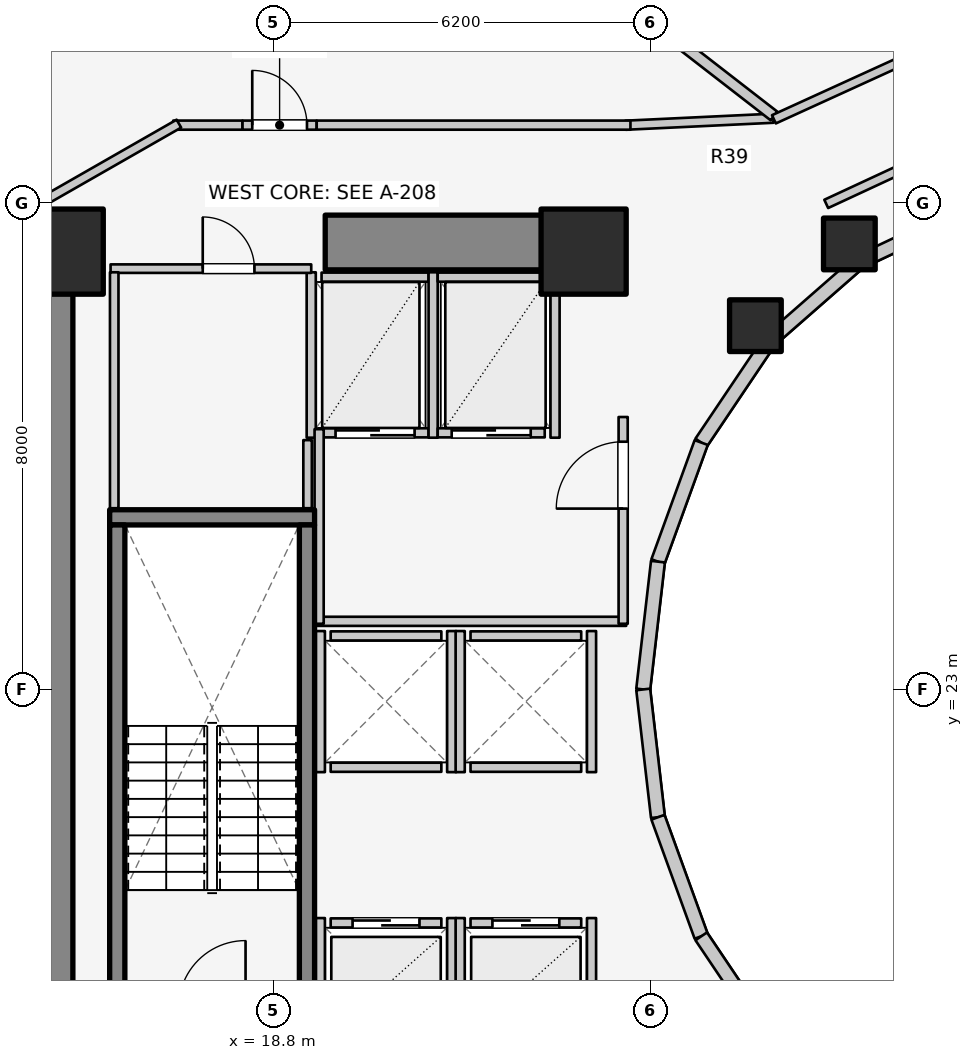
"""IFC4 building model, lengths in metres.
Left out: names, types, materials, properties, quantities, classifications, styles, units other than length and angle.
Written with IfcOpenShell. Run it as: python <this file> out.ifc"""

import sys

from ifc_helpers import new_model, si_unit, direction, frame, frame_2d, origin, origin_2d, place, context, subcontext, project, spatial, rectangle, extrude, element, fill, save


model = new_model("IFC4")
c1 = context("Model", 3, precision=1e-05, world=origin(), true_north=direction((0.0, 1.0)))
c2 = subcontext(c1, "Body", "Model", "MODEL_VIEW")
j1 = project(units=[si_unit("LENGTHUNIT", "METRE"), si_unit("PLANEANGLEUNIT", "RADIAN")], contexts=[c1])
p1 = place(None, origin())
s1 = spatial("IfcSite", under=j1, at=p1, CompositionType="ELEMENT")
p2 = place(p1, origin())
s2 = spatial("IfcBuilding", under=s1, at=p2, CompositionType="ELEMENT")
p3 = place(p2, frame((0.0, 0.0, 82.5)))
s3 = spatial("IfcBuildingStorey", under=s2, at=p3, CompositionType="ELEMENT", Elevation=82.5)
p4 = place(p3, frame((15.05, 17.05, 0.0), z_axis=(0.0, 0.0, 1.0), x_axis=(0.0, 1.0, 0.0)))
e1 = element("IfcWall", 1, at=p4, inside=s3, PredefinedType="SHEAR", context=c2, shape_type="SweptSolid", body=[
    extrude(rectangle(XDim=12.8, YDim=0.9, at=frame_2d((6.4, 0.0))), origin(), (0.0, 0.0, 1.0), 3.1),
])
p5 = place(p3, frame((19.65, 30.35, 0.0), z_axis=(0.0, 0.0, 1.0), x_axis=(1.0, 0.0, 0.0)))
e2 = element("IfcWall", 2, at=p5, inside=s3, PredefinedType="SHEAR", context=c2, shape_type="SweptSolid", body=[
    extrude(rectangle(XDim=4.5, YDim=0.9, at=frame_2d((2.25, 0.0))), origin(), (0.0, 0.0, 1.0), 3.1),
])
p6 = place(p3, frame((16.105, 25.83, 0.0), z_axis=(0.0, 0.0, 1.0), x_axis=(1.0, 0.0, 0.0)))
e3 = element("IfcWall", 3, at=p6, inside=s3, PredefinedType="SOLIDWALL", context=c2, shape_type="SweptSolid", body=[
    extrude(rectangle(XDim=3.37, YDim=0.25, at=frame_2d((1.685, 0.0))), origin(), (0.0, 0.0, 1.0), 3.1),
])
for number, where, z_axis, x_axis in (
    (4, (16.23, 17.895, 0.0), (0.0, 0.0, 1.0), (0.0, 1.0, 0.0)),
    (5, (19.35, 17.895, 0.0), (0.0, 0.0, 1.0), (0.0, 1.0, 0.0)),
):
    element("IfcWall", number, at=place(p3, frame(where, z_axis=z_axis, x_axis=x_axis)), inside=s3, PredefinedType="SOLIDWALL", context=c2, shape_type="SweptSolid", body=[
        extrude(rectangle(XDim=7.81, YDim=0.25, at=frame_2d((3.905, 0.0))), origin(), (0.0, 0.0, 1.0), 3.1),
    ])
for number, where, z_axis, x_axis in (
    (6, (23.9, 30.2, 0.0), (0.0, 0.0, 1.0), (1.0, 0.0, 0.0)),
    (7, (15.3, 30.2, 0.0), (0.0, 0.0, 1.0), (1.0, 0.0, 0.0)),
):
    element("IfcColumn", number, at=place(p3, frame(where, z_axis=z_axis, x_axis=x_axis)), inside=s3, PredefinedType="COLUMN", context=c2, shape_type="SweptSolid", body=[
        extrude(rectangle(XDim=1.4, YDim=1.4, at=origin_2d()), origin(), (0.0, 0.0, 1.0), 3.1),
    ])
for number, where, z_axis, x_axis in (
    (8, (28.27, 30.327, 0.0), (0.0, 0.0, 1.0), (1.0, 0.0, 0.0)),
    (9, (26.725, 28.982, 0.0), (0.0, 0.0, 1.0), (1.0, 0.0, 0.0)),
):
    element("IfcColumn", number, at=place(p3, frame(where, z_axis=z_axis, x_axis=x_axis)), inside=s3, PredefinedType="COLUMN", context=c2, shape_type="SweptSolid", body=[
        extrude(rectangle(XDim=0.85, YDim=0.85, at=origin_2d()), origin(), (0.0, 0.0, 1.0), 3.1),
    ])
p7 = place(p3, frame((30.157, 30.843, 0.0), z_axis=(0.0, 0.0, 1.0), x_axis=(-0.904179699603, -0.427152280606, 0.0)))
e10 = element("IfcWall", 10, at=p7, inside=s3, PredefinedType="STANDARD", context=c2, shape_type="SweptSolid", body=[
    extrude(rectangle(XDim=1.899, YDim=0.23, at=frame_2d((0.95, 0.0))), origin(), (0.0, 0.0, 1.0), 1.22),
])
p8 = place(p3, frame((28.44, 30.032, 0.0), z_axis=(0.0, 0.0, 1.0), x_axis=(-0.752576694707, -0.658504607869, 0.0)))
e11 = element("IfcWall", 11, at=p8, inside=s3, PredefinedType="STANDARD", context=c2, shape_type="SweptSolid", body=[
    extrude(rectangle(XDim=1.959, YDim=0.23, at=frame_2d((0.98, 0.0))), origin(), (0.0, 0.0, 1.0), 1.22),
])
p9 = place(p3, frame((26.965, 28.742, 0.0), z_axis=(0.0, 0.0, 1.0), x_axis=(-0.558197800898, -0.829707909492, 0.0)))
e12 = element("IfcWall", 12, at=p9, inside=s3, PredefinedType="STANDARD", context=c2, shape_type="SweptSolid", body=[
    extrude(rectangle(XDim=2.027, YDim=0.23, at=frame_2d((1.013, 0.0))), origin(), (0.0, 0.0, 1.0), 1.22),
])
p10 = place(p3, frame((25.834, 27.06, 0.0), z_axis=(0.0, 0.0, 1.0), x_axis=(-0.341423187295, -0.93990968033, 0.0)))
e13 = element("IfcWall", 13, at=p10, inside=s3, PredefinedType="STANDARD", context=c2, shape_type="SweptSolid", body=[
    extrude(rectangle(XDim=2.084, YDim=0.23, at=frame_2d((1.042, 0.0))), origin(), (0.0, 0.0, 1.0), 2.56),
])
for number, where, z_axis, x_axis in (
    (14, (25.123, 25.102, 0.0), (0.0, 0.0, 1.0), (-0.115, -0.993, 0.0)),
    (15, (24.88, 23.0, 0.0), (0.0, 0.0, 1.0), (0.115, -0.993, 0.0)),
):
    element("IfcWall", number, at=place(p3, frame(where, z_axis=z_axis, x_axis=x_axis)), inside=s3, PredefinedType="STANDARD", context=c2, shape_type="SweptSolid", body=[
        extrude(rectangle(XDim=2.115, YDim=0.23, at=frame_2d((1.058, 0.0))), origin(), (0.0, 0.0, 1.0), 2.56),
    ])
p11 = place(p3, frame((25.123, 20.898, 0.0), z_axis=(0.0, 0.0, 1.0), x_axis=(0.341423187295, -0.93990968033, 0.0)))
e16 = element("IfcWall", 16, at=p11, inside=s3, PredefinedType="STANDARD", context=c2, shape_type="SweptSolid", body=[
    extrude(rectangle(XDim=2.084, YDim=0.23, at=frame_2d((1.042, 0.0))), origin(), (0.0, 0.0, 1.0), 2.56),
])
p12 = place(p3, frame((25.834, 18.94, 0.0), z_axis=(0.0, 0.0, 1.0), x_axis=(0.558197800898, -0.829707909492, 0.0)))
e17 = element("IfcWall", 17, at=p12, inside=s3, PredefinedType="STANDARD", context=c2, shape_type="SweptSolid", body=[
    extrude(rectangle(XDim=2.027, YDim=0.23, at=frame_2d((1.013, 0.0))), origin(), (0.0, 0.0, 1.0), 1.22),
])
p13 = place(p3, frame((19.74, 19.16, 0.0), z_axis=(0.0, 0.0, 1.0), x_axis=(1.0, 0.0, 0.0)))
e18 = element("IfcWall", 18, at=p13, inside=s3, PredefinedType="SOLIDWALL", context=c2, shape_type="SweptSolid", body=[
    extrude(rectangle(XDim=1.82, YDim=0.15, at=frame_2d((0.91, 0.0))), origin(), (0.0, 0.0, 1.0), 2.575),
])
p14 = place(p13, frame((0.36, 0.0, 0.0)))
e19 = element("IfcOpeningElement", 19, at=p14, cuts=e18, PredefinedType="OPENING", context=c2, shape_type="SweptSolid", body=[
    extrude(rectangle(XDim=1.1, YDim=2.1, at=frame_2d((0.55, 1.05))), frame((0.0, 0.085, 0.0), z_axis=(0.0, -1.0, 0.0), x_axis=(1.0, 0.0, 0.0)), (0.0, 0.0, 1.0), 0.17),
])
p15 = place(p3, frame((19.57, 17.02, 0.0), z_axis=(0.0, 0.0, 1.0), x_axis=(0.0, 1.0, 0.0)))
e20 = element("IfcWall", 20, at=p15, inside=s3, PredefinedType="SOLIDWALL", context=c2, shape_type="SweptSolid", body=[
    extrude(rectangle(XDim=2.22, YDim=0.15, at=frame_2d((1.11, 0.0))), origin(), (0.0, 0.0, 1.0), 2.12),
])
p16 = place(p3, frame((21.73, 17.02, 0.0), z_axis=(0.0, 0.0, 1.0), x_axis=(0.0, 1.0, 0.0)))
e21 = element("IfcWall", 21, at=p16, inside=s3, PredefinedType="SOLIDWALL", context=c2, shape_type="SweptSolid", body=[
    extrude(rectangle(XDim=2.22, YDim=0.15, at=frame_2d((1.11, 0.0))), origin(), (0.0, 0.0, 1.0), 2.575),
])
p17 = place(p3, frame((22.04, 19.16, 0.0), z_axis=(0.0, 0.0, 1.0), x_axis=(1.0, 0.0, 0.0)))
e22 = element("IfcWall", 22, at=p17, inside=s3, PredefinedType="SOLIDWALL", context=c2, shape_type="SweptSolid", body=[
    extrude(rectangle(XDim=1.82, YDim=0.15, at=frame_2d((0.91, 0.0))), origin(), (0.0, 0.0, 1.0), 2.12),
])
p18 = place(p17, frame((0.36, 0.0, 0.0)))
e23 = element("IfcOpeningElement", 23, at=p18, cuts=e22, PredefinedType="OPENING", context=c2, shape_type="SweptSolid", body=[
    extrude(rectangle(XDim=1.1, YDim=2.1, at=frame_2d((0.55, 1.05))), frame((0.0, 0.085, 0.0), z_axis=(0.0, -1.0, 0.0), x_axis=(1.0, 0.0, 0.0)), (0.0, 0.0, 1.0), 0.17),
])
p19 = place(p3, frame((21.87, 17.02, 0.0), z_axis=(0.0, 0.0, 1.0), x_axis=(0.0, 1.0, 0.0)))
e24 = element("IfcWall", 24, at=p19, inside=s3, PredefinedType="SOLIDWALL", context=c2, shape_type="SweptSolid", body=[
    extrude(rectangle(XDim=2.22, YDim=0.15, at=frame_2d((1.11, 0.0))), origin(), (0.0, 0.0, 1.0), 2.575),
])
p20 = place(p3, frame((24.03, 17.02, 0.0), z_axis=(0.0, 0.0, 1.0), x_axis=(0.0, 1.0, 0.0)))
e25 = element("IfcWall", 25, at=p20, inside=s3, PredefinedType="SOLIDWALL", context=c2, shape_type="SweptSolid", body=[
    extrude(rectangle(XDim=2.22, YDim=0.15, at=frame_2d((1.11, 0.0))), origin(), (0.0, 0.0, 1.0), 1.873),
])
for number, where, z_axis, x_axis in (
    (26, (19.74, 21.72, 0.0), (0.0, 0.0, 1.0), (1.0, 0.0, 0.0)),
    (27, (19.74, 23.88, 0.0), (0.0, 0.0, 1.0), (1.0, 0.0, 0.0)),
):
    element("IfcWall", number, at=place(p3, frame(where, z_axis=z_axis, x_axis=x_axis)), inside=s3, PredefinedType="SOLIDWALL", context=c2, shape_type="SweptSolid", body=[
        extrude(rectangle(XDim=1.82, YDim=0.15, at=frame_2d((0.91, 0.0))), origin(), (0.0, 0.0, 1.0), 2.575),
    ])
for number, where, z_axis, x_axis in (
    (28, (19.57, 21.64, 0.0), (0.0, 0.0, 1.0), (0.0, 1.0, 0.0)),
    (29, (21.73, 21.64, 0.0), (0.0, 0.0, 1.0), (0.0, 1.0, 0.0)),
):
    element("IfcWall", number, at=place(p3, frame(where, z_axis=z_axis, x_axis=x_axis)), inside=s3, PredefinedType="SOLIDWALL", context=c2, shape_type="SweptSolid", body=[
        extrude(rectangle(XDim=2.32, YDim=0.15, at=frame_2d((1.16, 0.0))), origin(), (0.0, 0.0, 1.0), 2.575),
    ])
for number, where, z_axis, x_axis in (
    (30, (22.04, 21.72, 0.0), (0.0, 0.0, 1.0), (1.0, 0.0, 0.0)),
    (31, (22.04, 23.88, 0.0), (0.0, 0.0, 1.0), (1.0, 0.0, 0.0)),
):
    element("IfcWall", number, at=place(p3, frame(where, z_axis=z_axis, x_axis=x_axis)), inside=s3, PredefinedType="SOLIDWALL", context=c2, shape_type="SweptSolid", body=[
        extrude(rectangle(XDim=1.82, YDim=0.15, at=frame_2d((0.91, 0.0))), origin(), (0.0, 0.0, 1.0), 2.12),
    ])
p21 = place(p3, frame((21.87, 21.64, 0.0), z_axis=(0.0, 0.0, 1.0), x_axis=(0.0, 1.0, 0.0)))
e32 = element("IfcWall", 32, at=p21, inside=s3, PredefinedType="SOLIDWALL", context=c2, shape_type="SweptSolid", body=[
    extrude(rectangle(XDim=2.32, YDim=0.15, at=frame_2d((1.16, 0.0))), origin(), (0.0, 0.0, 1.0), 2.575),
])
p22 = place(p3, frame((24.03, 21.64, 0.0), z_axis=(0.0, 0.0, 1.0), x_axis=(0.0, 1.0, 0.0)))
e33 = element("IfcWall", 33, at=p22, inside=s3, PredefinedType="SOLIDWALL", context=c2, shape_type="SweptSolid", body=[
    extrude(rectangle(XDim=2.32, YDim=0.15, at=frame_2d((1.16, 0.0))), origin(), (0.0, 0.0, 1.0), 2.12),
])
p23 = place(p3, frame((19.59, 27.22, 0.0), z_axis=(0.0, 0.0, 1.0), x_axis=(1.0, 0.0, 0.0)))
e34 = element("IfcWall", 34, at=p23, inside=s3, PredefinedType="SOLIDWALL", context=c2, shape_type="SweptSolid", body=[
    extrude(rectangle(XDim=1.76, YDim=0.15, at=frame_2d((0.88, 0.0))), origin(), (0.0, 0.0, 1.0), 2.575),
])
p24 = place(p23, frame((0.23, 0.0, 0.0)))
e35 = element("IfcOpeningElement", 35, at=p24, cuts=e34, PredefinedType="OPENING", context=c2, shape_type="SweptSolid", body=[
    extrude(rectangle(XDim=1.3, YDim=2.1, at=frame_2d((0.65, 1.05))), frame((0.0, 0.085, 0.0), z_axis=(0.0, -1.0, 0.0), x_axis=(1.0, 0.0, 0.0)), (0.0, 0.0, 1.0), 0.17),
])
p25 = place(p3, frame((19.59, 29.78, 0.0), z_axis=(0.0, 0.0, 1.0), x_axis=(1.0, 0.0, 0.0)))
e36 = element("IfcWall", 36, at=p25, inside=s3, PredefinedType="SOLIDWALL", context=c2, shape_type="SweptSolid", body=[
    extrude(rectangle(XDim=1.76, YDim=0.15, at=frame_2d((0.88, 0.0))), origin(), (0.0, 0.0, 1.0), 2.575),
])
for number, where, z_axis, x_axis in (
    (37, (19.42, 27.14, 0.0), (0.0, 0.0, 1.0), (0.0, 1.0, 0.0)),
    (38, (21.425, 27.14, 0.0), (0.0, 0.0, 1.0), (0.0, 1.0, 0.0)),
):
    element("IfcWall", number, at=place(p3, frame(where, z_axis=z_axis, x_axis=x_axis)), inside=s3, PredefinedType="SOLIDWALL", context=c2, shape_type="SweptSolid", body=[
        extrude(rectangle(XDim=2.72, YDim=0.15, at=frame_2d((1.36, 0.0))), origin(), (0.0, 0.0, 1.0), 2.575),
    ])
p26 = place(p3, frame((21.5, 27.22, 0.0), z_axis=(0.0, 0.0, 1.0), x_axis=(1.0, 0.0, 0.0)))
e39 = element("IfcWall", 39, at=p26, inside=s3, PredefinedType="SOLIDWALL", context=c2, shape_type="SweptSolid", body=[
    extrude(rectangle(XDim=1.76, YDim=0.15, at=frame_2d((0.88, 0.0))), origin(), (0.0, 0.0, 1.0), 2.575),
])
p27 = place(p26, frame((0.23, 0.0, 0.0)))
e40 = element("IfcOpeningElement", 40, at=p27, cuts=e39, PredefinedType="OPENING", context=c2, shape_type="SweptSolid", body=[
    extrude(rectangle(XDim=1.3, YDim=2.1, at=frame_2d((0.65, 1.05))), frame((0.0, 0.085, 0.0), z_axis=(0.0, -1.0, 0.0), x_axis=(1.0, 0.0, 0.0)), (0.0, 0.0, 1.0), 0.17),
])
p28 = place(p3, frame((21.5, 29.78, 0.0), z_axis=(0.0, 0.0, 1.0), x_axis=(1.0, 0.0, 0.0)))
e41 = element("IfcWall", 41, at=p28, inside=s3, PredefinedType="SOLIDWALL", context=c2, shape_type="SweptSolid", body=[
    extrude(rectangle(XDim=1.76, YDim=0.15, at=frame_2d((0.88, 0.0))), origin(), (0.0, 0.0, 1.0), 2.575),
])
p29 = place(p3, frame((23.43, 27.14, 0.0), z_axis=(0.0, 0.0, 1.0), x_axis=(0.0, 1.0, 0.0)))
e42 = element("IfcWall", 42, at=p29, inside=s3, PredefinedType="SOLIDWALL", context=c2, shape_type="SweptSolid", body=[
    extrude(rectangle(XDim=2.72, YDim=0.15, at=frame_2d((1.36, 0.0))), origin(), (0.0, 0.0, 1.0), 2.575),
])
p30 = place(p3, frame((19.52, 24.12, 0.0), z_axis=(0.0, 0.0, 1.0), x_axis=(1.0, 0.0, 0.0)))
e43 = element("IfcWall", 43, at=p30, inside=s3, PredefinedType="PARTITIONING", context=c2, shape_type="SweptSolid", body=[
    extrude(rectangle(XDim=5.08, YDim=0.15, at=frame_2d((2.54, 0.0))), origin(), (0.0, 0.0, 1.0), 2.12),
])
p31 = place(p3, frame((19.55, 24.08, 0.0), z_axis=(0.0, 0.0, 1.0), x_axis=(0.0, 1.0, 0.0)))
e44 = element("IfcWall", 44, at=p31, inside=s3, PredefinedType="PARTITIONING", context=c2, shape_type="SweptSolid", body=[
    extrude(rectangle(XDim=3.2, YDim=0.15, at=frame_2d((1.6, 0.0))), origin(), (0.0, 0.0, 1.0), 2.575),
])
p32 = place(p3, frame((24.55, 24.08, 0.0), z_axis=(0.0, 0.0, 1.0), x_axis=(0.0, 1.0, 0.0)))
e45 = element("IfcWall", 45, at=p32, inside=s3, PredefinedType="PARTITIONING", context=c2, shape_type="SweptSolid", body=[
    extrude(rectangle(XDim=3.4, YDim=0.15, at=frame_2d((1.7, 0.0))), origin(), (0.0, 0.0, 1.0), 2.575),
])
p33 = place(p32, frame((1.894, 0.0, 0.0)))
e46 = element("IfcOpeningElement", 46, at=p33, cuts=e45, PredefinedType="OPENING", context=c2, shape_type="SweptSolid", body=[
    extrude(rectangle(XDim=1.1, YDim=2.1, at=frame_2d((0.55, 1.05))), frame((0.0, 0.085, 0.0), z_axis=(0.0, -1.0, 0.0), x_axis=(1.0, 0.0, 0.0)), (0.0, 0.0, 1.0), 0.17),
])
p34 = place(p3, frame((16.12, 29.92, 0.0), z_axis=(0.0, 0.0, 1.0), x_axis=(1.0, 0.0, 0.0)))
e47 = element("IfcWall", 47, at=p34, inside=s3, PredefinedType="PLUMBINGWALL", context=c2, shape_type="SweptSolid", body=[
    extrude(rectangle(XDim=3.3, YDim=0.14, at=frame_2d((1.65, 0.0))), origin(), (0.0, 0.0, 1.0), 2.575),
])
p35 = place(p34, frame((1.516, 0.0, 0.0)))
e48 = element("IfcOpeningElement", 48, at=p35, cuts=e47, PredefinedType="OPENING", context=c2, shape_type="SweptSolid", body=[
    extrude(rectangle(XDim=0.85, YDim=2.05, at=frame_2d((0.425, 1.025))), frame((0.0, 0.08, 0.0), z_axis=(0.0, -1.0, 0.0), x_axis=(1.0, 0.0, 0.0)), (0.0, 0.0, 1.0), 0.16),
])
p36 = place(p3, frame((16.18, 25.98, 0.0), z_axis=(0.0, 0.0, 1.0), x_axis=(0.0, 1.0, 0.0)))
e49 = element("IfcWall", 49, at=p36, inside=s3, PredefinedType="PLUMBINGWALL", context=c2, shape_type="SweptSolid", body=[
    extrude(rectangle(XDim=3.88, YDim=0.14, at=frame_2d((1.94, 0.0))), origin(), (0.0, 0.0, 1.0), 2.575),
])
p37 = place(p3, frame((19.36, 25.98, 0.0), z_axis=(0.0, 0.0, 1.0), x_axis=(0.0, 1.0, 0.0)))
e50 = element("IfcWall", 50, at=p37, inside=s3, PredefinedType="PLUMBINGWALL", context=c2, shape_type="SweptSolid", body=[
    extrude(rectangle(XDim=1.12, YDim=0.14, at=frame_2d((0.56, 0.0))), origin(), (0.0, 0.0, 1.0), 2.575),
])
p38 = place(p3, frame((29.873, 31.906, 0.0), z_axis=(0.0, 0.0, 1.0), x_axis=(-0.906943449489, -0.421252393975, 0.0)))
e51 = element("IfcWall", 51, at=p38, inside=s3, PredefinedType="PARTITIONING", context=c2, shape_type="SweptSolid", body=[
    extrude(rectangle(XDim=2.186, YDim=0.15, at=frame_2d((1.093, 0.0))), origin(), (0.0, 0.0, 1.0), 1.22),
])
p39 = place(p3, frame((27.02, 32.394, 0.0), z_axis=(0.0, 0.0, 1.0), x_axis=(-0.998877427952, -0.047369651964, 0.0)))
e52 = element("IfcWall", 52, at=p39, inside=s3, PredefinedType="PARTITIONING", context=c2, shape_type="SweptSolid", body=[
    extrude(rectangle(XDim=2.433, YDim=0.15, at=frame_2d((1.216, 0.0))), origin(), (0.0, 0.0, 1.0), 1.22),
])
p40 = place(p3, frame((17.15, 32.28, 0.0), z_axis=(0.0, 0.0, 1.0), x_axis=(1.0, 0.0, 0.0)))
e53 = element("IfcWall", 53, at=p40, inside=s3, PredefinedType="PARTITIONING", context=c2, shape_type="SweptSolid", body=[
    extrude(rectangle(XDim=1.14, YDim=0.15, at=frame_2d((0.57, 0.0))), origin(), (0.0, 0.0, 1.0), 2.575),
])
p41 = place(p3, frame((18.29, 32.28, 0.0), z_axis=(0.0, 0.0, 1.0), x_axis=(1.0, 0.0, 0.0)))
e54 = element("IfcWall", 54, at=p41, inside=s3, PredefinedType="PARTITIONING", context=c2, shape_type="SweptSolid", body=[
    extrude(rectangle(XDim=1.22, YDim=0.15, at=frame_2d((0.61, 0.0))), origin(), (0.0, 0.0, 1.0), 2.575),
])
p42 = place(p41, frame((0.16, 0.0, 0.0)))
e55 = element("IfcOpeningElement", 55, at=p42, cuts=e54, PredefinedType="OPENING", context=c2, shape_type="SweptSolid", body=[
    extrude(rectangle(XDim=0.9, YDim=2.1, at=frame_2d((0.45, 1.05))), frame((0.0, 0.085, 0.0), z_axis=(0.0, -1.0, 0.0), x_axis=(1.0, 0.0, 0.0)), (0.0, 0.0, 1.0), 0.17),
])
p43 = place(p3, frame((19.51, 32.28, 0.0), z_axis=(0.0, 0.0, 1.0), x_axis=(1.0, 0.0, 0.0)))
e56 = element("IfcWall", 56, at=p43, inside=s3, PredefinedType="PARTITIONING", context=c2, shape_type="SweptSolid", body=[
    extrude(rectangle(XDim=5.16, YDim=0.15, at=frame_2d((2.58, 0.0))), origin(), (0.0, 0.0, 1.0), 1.22),
])
p44 = place(p3, frame((17.243, 32.305, 0.0), z_axis=(0.0, 0.0, 1.0), x_axis=(-0.867991349648, -0.496579315857, 0.0)))
e57 = element("IfcWall", 57, at=p44, inside=s3, PredefinedType="PARTITIONING", context=c2, shape_type="SweptSolid", body=[
    extrude(rectangle(XDim=2.567, YDim=0.15, at=frame_2d((1.283, 0.0))), origin(), (0.0, 0.0, 1.0), 1.22),
])
p45 = place(p3, frame((27.031, 32.43, 0.0), z_axis=(0.0, 0.0, 1.0), x_axis=(-0.790421780952, 0.612562983045, 0.0)))
e58 = element("IfcWall", 58, at=p45, inside=s3, PredefinedType="PARTITIONING", context=c2, shape_type="SweptSolid", body=[
    extrude(rectangle(XDim=9.662, YDim=0.18, at=frame_2d((4.831, 0.0))), origin(), (0.0, 0.0, 1.0), 1.22),
])
p46 = place(p3, frame((29.496, 33.501, 0.0), z_axis=(0.0, 0.0, 1.0), x_axis=(-0.909730151902, -0.415200012909, 0.0)))
e59 = element("IfcWall", 59, at=p46, inside=s3, PredefinedType="PARTITIONING", context=c2, shape_type="SweptSolid", body=[
    extrude(rectangle(XDim=2.711, YDim=0.15, at=frame_2d((1.355, 0.0))), origin(), (0.0, 0.0, 1.0), 1.22),
])
p47 = place(p3, frame((29.479, 33.439, 0.0), z_axis=(0.0, 0.0, 1.0), x_axis=(-0.570110374441, 0.821568110965, 0.0)))
e60 = element("IfcWall", 60, at=p47, inside=s3, PredefinedType="PLUMBINGWALL", context=c2, shape_type="SweptSolid", body=[
    extrude(rectangle(XDim=2.1, YDim=0.14, at=frame_2d((1.05, 0.0))), origin(), (0.0, 0.0, 1.0), 1.22),
])
p48 = place(p14, origin())
e61 = element("IfcDoor", 61, at=p48, inside=s3, OperationType="DOUBLE_DOOR_SLIDING", PredefinedType="DOOR", context=c2, shape_type="SweptSolid", body=[
    extrude(rectangle(XDim=1.1, YDim=2.1, at=frame_2d((0.55, 1.05))), frame((0.0, 0.025, 0.0), z_axis=(0.0, -1.0, 0.0), x_axis=(1.0, 0.0, 0.0)), (0.0, 0.0, 1.0), 0.05),
])
fill(e19, e61)
p49 = place(p18, origin())
e62 = element("IfcDoor", 62, at=p49, inside=s3, OperationType="DOUBLE_DOOR_SLIDING", PredefinedType="DOOR", context=c2, shape_type="SweptSolid", body=[
    extrude(rectangle(XDim=1.1, YDim=2.1, at=frame_2d((0.55, 1.05))), frame((0.0, 0.025, 0.0), z_axis=(0.0, -1.0, 0.0), x_axis=(1.0, 0.0, 0.0)), (0.0, 0.0, 1.0), 0.05),
])
fill(e23, e62)
p50 = place(p24, origin())
e63 = element("IfcDoor", 63, at=p50, inside=s3, OperationType="DOUBLE_DOOR_SLIDING", PredefinedType="DOOR", context=c2, shape_type="SweptSolid", body=[
    extrude(rectangle(XDim=1.3, YDim=2.1, at=frame_2d((0.65, 1.05))), frame((0.0, 0.025, 0.0), z_axis=(0.0, -1.0, 0.0), x_axis=(1.0, 0.0, 0.0)), (0.0, 0.0, 1.0), 0.05),
])
fill(e35, e63)
p51 = place(p27, origin())
e64 = element("IfcDoor", 64, at=p51, inside=s3, OperationType="DOUBLE_DOOR_SLIDING", PredefinedType="DOOR", context=c2, shape_type="SweptSolid", body=[
    extrude(rectangle(XDim=1.3, YDim=2.1, at=frame_2d((0.65, 1.05))), frame((0.0, 0.025, 0.0), z_axis=(0.0, -1.0, 0.0), x_axis=(1.0, 0.0, 0.0)), (0.0, 0.0, 1.0), 0.05),
])
fill(e40, e64)
p52 = place(p33, origin())
e65 = element("IfcDoor", 65, at=p52, inside=s3, OperationType="SINGLE_SWING_LEFT", PredefinedType="DOOR", context=c2, shape_type="SweptSolid", body=[
    extrude(rectangle(XDim=1.1, YDim=2.1, at=frame_2d((0.55, 1.05))), frame((0.0, 0.025, 0.0), z_axis=(0.0, -1.0, 0.0), x_axis=(1.0, 0.0, 0.0)), (0.0, 0.0, 1.0), 0.05),
])
fill(e46, e65)
p53 = place(p35, origin())
e66 = element("IfcDoor", 66, at=p53, inside=s3, OperationType="SINGLE_SWING_LEFT", PredefinedType="DOOR", context=c2, shape_type="SweptSolid", body=[
    extrude(rectangle(XDim=0.85, YDim=2.05, at=frame_2d((0.425, 1.025))), frame((0.0, 0.025, 0.0), z_axis=(0.0, -1.0, 0.0), x_axis=(1.0, 0.0, 0.0)), (0.0, 0.0, 1.0), 0.05),
])
fill(e48, e66)
p54 = place(p42, origin())
e67 = element("IfcDoor", 67, at=p54, inside=s3, OperationType="SINGLE_SWING_LEFT", PredefinedType="DOOR", context=c2, shape_type="SweptSolid", body=[
    extrude(rectangle(XDim=0.9, YDim=2.1, at=frame_2d((0.45, 1.05))), frame((0.0, 0.025, 0.0), z_axis=(0.0, -1.0, 0.0), x_axis=(1.0, 0.0, 0.0)), (0.0, 0.0, 1.0), 0.05),
])
fill(e55, e67)
save(model, sys.argv[1])
